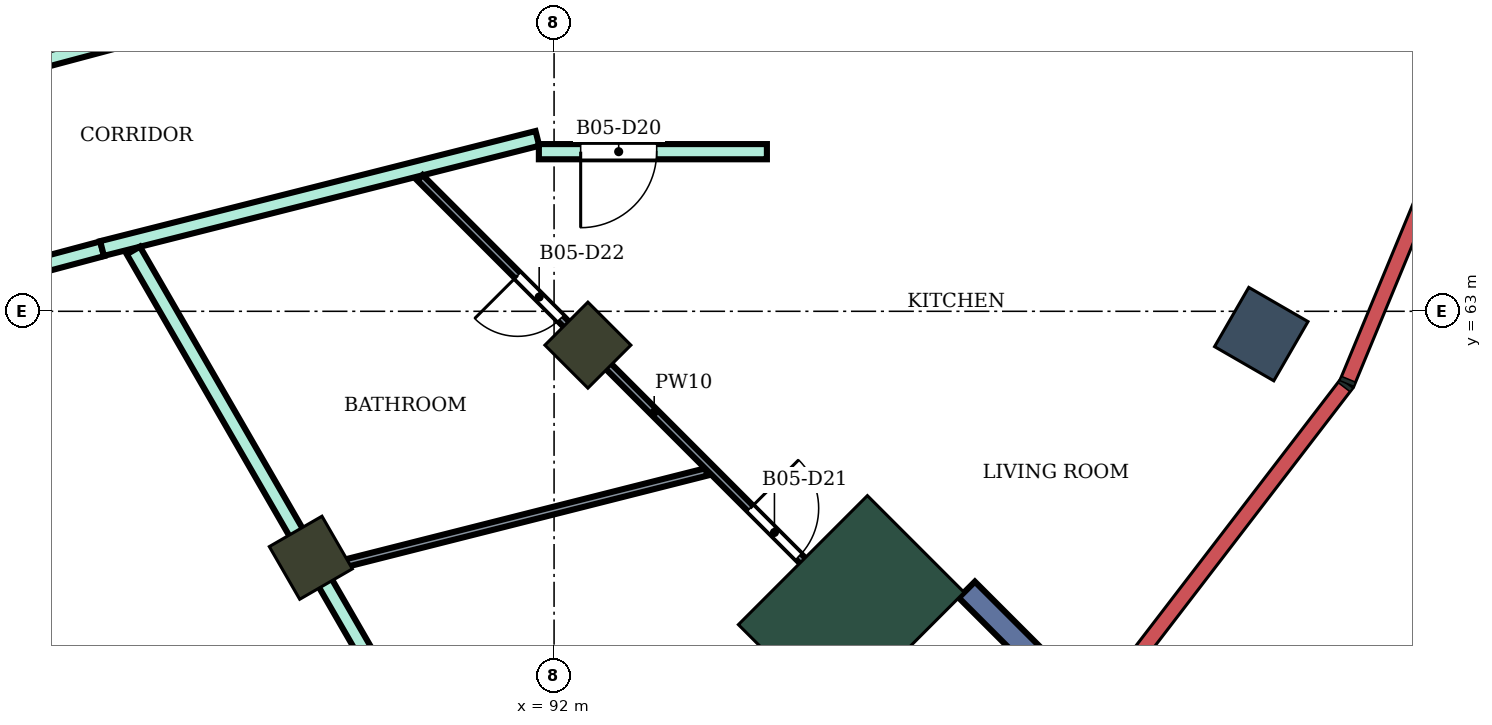
"""IFC4 building model, lengths in metres.
Left out: names, types, materials, properties, quantities, classifications, styles, units other than length and angle.
Written with IfcOpenShell. Run it as: python <this file> out.ifc"""

import sys

from ifc_helpers import new_model, si_unit, direction, frame, frame_2d, origin, origin_2d, place, context, subcontext, project, spatial, rectangle, extrude, element, fill, save


model = new_model("IFC4")
c1 = context("Model", 3, precision=1e-05, world=origin(), true_north=direction((0.0, 1.0)))
c2 = subcontext(c1, "Body", "Model", "MODEL_VIEW")
j1 = project(units=[si_unit("LENGTHUNIT", "METRE"), si_unit("PLANEANGLEUNIT", "RADIAN")], contexts=[c1])
p1 = place(None, origin())
s1 = spatial("IfcSite", under=j1, at=p1, CompositionType="ELEMENT")
p2 = place(p1, origin())
s2 = spatial("IfcBuilding", under=s1, at=p2, CompositionType="ELEMENT")
p3 = place(p2, frame((0.0, 0.0, 262.5)))
s3 = spatial("IfcBuildingStorey", under=s2, at=p3, CompositionType="ELEMENT", Elevation=262.5)
p4 = place(p3, frame((101.304, 62.7, 0.0), z_axis=(0.0, 0.0, 1.0), x_axis=(0.866025403784, -0.5, 0.0)))
e1 = element("IfcColumn", 1, at=p4, inside=s3, PredefinedType="COLUMN", context=c2, shape_type="SweptSolid", body=[
    extrude(rectangle(XDim=0.9, YDim=0.9, at=origin_2d()), origin(), (0.0, 0.0, 1.0), 4.2),
])
for number, where, z_axis, x_axis in (
    (2, (88.8, 59.758, 0.0), (0.0, 0.0, 1.0), (0.5, -0.866, 0.0)),
    (3, (92.445, 62.555, 0.0), (0.0, 0.0, 1.0), (0.707, -0.707, 0.0)),
):
    element("IfcColumn", number, at=place(p3, frame(where, z_axis=z_axis, x_axis=x_axis)), inside=s3, PredefinedType="COLUMN", context=c2, shape_type="SweptSolid", body=[
        extrude(rectangle(XDim=0.8, YDim=0.8, at=origin_2d()), origin(), (0.0, 0.0, 1.0), 4.2),
    ])
p5 = place(p3, frame((95.91, 59.09, 0.0), z_axis=(0.0, 0.0, 1.0), x_axis=(0.707106781187, -0.707106781187, 0.0)))
e4 = element("IfcColumn", 4, at=p5, inside=s3, PredefinedType="COLUMN", context=c2, shape_type="SweptSolid", body=[
    extrude(rectangle(XDim=1.8, YDim=2.4, at=origin_2d()), origin(), (0.0, 0.0, 1.0), 4.2),
])
p6 = place(p3, frame((97.43, 59.338, 0.0), z_axis=(0.0, 0.0, 1.0), x_axis=(0.707106781187, -0.707106781187, 0.0)))
e5 = element("IfcWall", 5, at=p6, inside=s3, PredefinedType="NOTDEFINED", context=c2, shape_type="SweptSolid", body=[
    extrude(rectangle(XDim=2.416, YDim=0.3, at=frame_2d((1.208, 0.0))), origin(), (0.0, 0.0, 1.0), 4.2),
])
p7 = place(p3, frame((80.048, 62.217, 0.0), z_axis=(0.0, 0.0, 1.0), x_axis=(0.966097920642, 0.258175923996, 0.0)))
e6 = element("IfcWall", 6, at=p7, inside=s3, PredefinedType="PARTITIONING", context=c2, shape_type="SweptSolid", body=[
    extrude(rectangle(XDim=6.217, YDim=0.2, at=frame_2d((3.108, 0.0))), origin(), (0.0, 0.0, 1.0), 3.75),
])
p8 = place(p7, frame((3.792, 0.0, 0.0)))
e7 = element("IfcOpeningElement", 7, at=p8, cuts=e6, PredefinedType="OPENING", context=c2, shape_type="SweptSolid", body=[
    extrude(rectangle(XDim=1.0, YDim=2.1, at=frame_2d((0.5, 1.05))), frame((0.0, 0.11, 0.0), z_axis=(0.0, -1.0, 0.0), x_axis=(1.0, 0.0, 0.0)), (0.0, 0.0, 1.0), 0.22),
])
p9 = place(p3, frame((80.0, 64.898, 0.0), z_axis=(0.0, 0.0, 1.0), x_axis=(0.966236923997, 0.25765520896, 0.0)))
e8 = element("IfcWall", 8, at=p9, inside=s3, PredefinedType="PARTITIONING", context=c2, shape_type="SweptSolid", body=[
    extrude(rectangle(XDim=8.168, YDim=0.2, at=frame_2d((4.084, 0.0))), origin(), (0.0, 0.0, 1.0), 3.75),
])
p10 = place(p9, frame((1.893, 0.0, 0.0)))
e9 = element("IfcOpeningElement", 9, at=p10, cuts=e8, PredefinedType="OPENING", context=c2, shape_type="SweptSolid", body=[
    extrude(rectangle(XDim=1.8, YDim=2.1, at=frame_2d((0.9, 1.05))), frame((0.0, 0.11, 0.0), z_axis=(0.0, -1.0, 0.0), x_axis=(1.0, 0.0, 0.0)), (0.0, 0.0, 1.0), 0.22),
])
p11 = place(p3, frame((86.053, 63.826, 0.0), z_axis=(0.0, 0.0, 1.0), x_axis=(0.969490004987, 0.245130843083, 0.0)))
e10 = element("IfcWall", 10, at=p11, inside=s3, PredefinedType="PARTITIONING", context=c2, shape_type="SweptSolid", body=[
    extrude(rectangle(XDim=5.908, YDim=0.2, at=frame_2d((2.954, 0.0))), origin(), (0.0, 0.0, 1.0), 3.75),
])
p12 = place(p3, frame((86.465, 63.801, 0.0), z_axis=(0.0, 0.0, 1.0), x_axis=(0.499914633865, -0.866074684336, 0.0)))
e11 = element("IfcWall", 11, at=p12, inside=s3, PredefinedType="PARTITIONING", context=c2, shape_type="SweptSolid", body=[
    extrude(rectangle(XDim=12.866, YDim=0.2, at=frame_2d((6.433, 0.0))), origin(), (0.0, 0.0, 1.0), 3.75),
])
p13 = place(p3, frame((91.8, 65.1, 0.0), z_axis=(0.0, 0.0, 1.0), x_axis=(1.0, 0.0, 0.0)))
e12 = element("IfcWall", 12, at=p13, inside=s3, PredefinedType="PARTITIONING", context=c2, shape_type="SweptSolid", body=[
    extrude(rectangle(XDim=3.0, YDim=0.2, at=frame_2d((1.5, 0.0))), origin(), (0.0, 0.0, 1.0), 3.75),
])
p14 = place(p13, frame((0.55, 0.0, 0.0)))
e13 = element("IfcOpeningElement", 13, at=p14, cuts=e12, PredefinedType="OPENING", context=c2, shape_type="SweptSolid", body=[
    extrude(rectangle(XDim=1.0, YDim=2.1, at=frame_2d((0.5, 1.05))), frame((0.0, 0.11, 0.0), z_axis=(0.0, -1.0, 0.0), x_axis=(1.0, 0.0, 0.0)), (0.0, 0.0, 1.0), 0.22),
])
p15 = place(p3, frame((83.226, 62.954, 0.0), z_axis=(0.0, 0.0, 1.0), x_axis=(0.258737611245, -0.965947642746, 0.0)))
e14 = element("IfcWall", 14, at=p15, inside=s3, PredefinedType="PARTITIONING", context=c2, shape_type="SweptSolid", body=[
    extrude(rectangle(XDim=13.328, YDim=0.1, at=frame_2d((6.664, 0.0))), origin(), (0.0, 0.0, 1.0), 3.75),
])
p16 = place(p15, frame((9.634, 0.0, 0.0)))
e15 = element("IfcOpeningElement", 15, at=p16, cuts=e14, PredefinedType="OPENING", context=c2, shape_type="SweptSolid", body=[
    extrude(rectangle(XDim=0.9, YDim=2.1, at=frame_2d((0.45, 1.05))), frame((0.0, 0.06, 0.0), z_axis=(0.0, -1.0, 0.0), x_axis=(1.0, 0.0, 0.0)), (0.0, 0.0, 1.0), 0.12),
])
p17 = place(p15, frame((2.6, 0.0, 0.0)))
e16 = element("IfcOpeningElement", 16, at=p17, cuts=e14, PredefinedType="OPENING", context=c2, shape_type="SweptSolid", body=[
    extrude(rectangle(XDim=0.8, YDim=2.1, at=frame_2d((0.4, 1.05))), frame((0.0, 0.06, 0.0), z_axis=(0.0, -1.0, 0.0), x_axis=(1.0, 0.0, 0.0)), (0.0, 0.0, 1.0), 0.12),
])
p18 = place(p3, frame((89.002, 59.621, 0.0), z_axis=(0.0, 0.0, 1.0), x_axis=(0.969445576262, 0.245306491285, 0.0)))
e17 = element("IfcWall", 17, at=p18, inside=s3, PredefinedType="PARTITIONING", context=c2, shape_type="SweptSolid", body=[
    extrude(rectangle(XDim=5.16, YDim=0.1, at=frame_2d((2.58, 0.0))), origin(), (0.0, 0.0, 1.0), 3.75),
])
p19 = place(p3, frame((90.235, 64.757, 0.0), z_axis=(0.0, 0.0, 1.0), x_axis=(0.706924769926, -0.707288745609, 0.0)))
e18 = element("IfcWall", 18, at=p19, inside=s3, PredefinedType="PARTITIONING", context=c2, shape_type="SweptSolid", body=[
    extrude(rectangle(XDim=8.72, YDim=0.1, at=frame_2d((4.36, 0.0))), origin(), (0.0, 0.0, 1.0), 3.75),
])
p20 = place(p19, frame((6.148, 0.0, 0.0)))
e19 = element("IfcOpeningElement", 19, at=p20, cuts=e18, PredefinedType="OPENING", context=c2, shape_type="SweptSolid", body=[
    extrude(rectangle(XDim=0.9, YDim=2.1, at=frame_2d((0.45, 1.05))), frame((0.0, 0.06, 0.0), z_axis=(0.0, -1.0, 0.0), x_axis=(1.0, 0.0, 0.0)), (0.0, 0.0, 1.0), 0.12),
])
p21 = place(p19, frame((1.819, 0.0, 0.0)))
e20 = element("IfcOpeningElement", 20, at=p21, cuts=e18, PredefinedType="OPENING", context=c2, shape_type="SweptSolid", body=[
    extrude(rectangle(XDim=0.8, YDim=2.1, at=frame_2d((0.4, 1.05))), frame((0.0, 0.06, 0.0), z_axis=(0.0, -1.0, 0.0), x_axis=(1.0, 0.0, 0.0)), (0.0, 0.0, 1.0), 0.12),
])
p22 = place(p14, frame((1.0, 0.0, 0.0), z_axis=(0.0, 0.0, 1.0), x_axis=(-1.0, 0.0, 0.0)))
e21 = element("IfcDoor", 21, at=p22, inside=s3, OperationType="SINGLE_SWING_RIGHT", PredefinedType="DOOR", context=c2, shape_type="SweptSolid", body=[
    extrude(rectangle(XDim=1.0, YDim=2.1, at=frame_2d((0.5, 1.05))), frame((0.0, 0.025, 0.0), z_axis=(0.0, -1.0, 0.0), x_axis=(1.0, 0.0, 0.0)), (0.0, 0.0, 1.0), 0.05),
])
fill(e13, e21)
p23 = place(p20, origin())
e22 = element("IfcDoor", 22, at=p23, inside=s3, OperationType="SINGLE_SWING_LEFT", PredefinedType="DOOR", context=c2, shape_type="SweptSolid", body=[
    extrude(rectangle(XDim=0.9, YDim=2.1, at=frame_2d((0.45, 1.05))), frame((0.0, 0.025, 0.0), z_axis=(0.0, -1.0, 0.0), x_axis=(1.0, 0.0, 0.0)), (0.0, 0.0, 1.0), 0.05),
])
fill(e19, e22)
p24 = place(p21, frame((0.8, 0.0, 0.0), z_axis=(0.0, 0.0, 1.0), x_axis=(-1.0, 0.0, 0.0)))
e23 = element("IfcDoor", 23, at=p24, inside=s3, OperationType="SINGLE_SWING_RIGHT", PredefinedType="DOOR", context=c2, shape_type="SweptSolid", body=[
    extrude(rectangle(XDim=0.8, YDim=2.1, at=frame_2d((0.4, 1.05))), frame((0.0, 0.025, 0.0), z_axis=(0.0, -1.0, 0.0), x_axis=(1.0, 0.0, 0.0)), (0.0, 0.0, 1.0), 0.05),
])
fill(e20, e23)
save(model, sys.argv[1])
